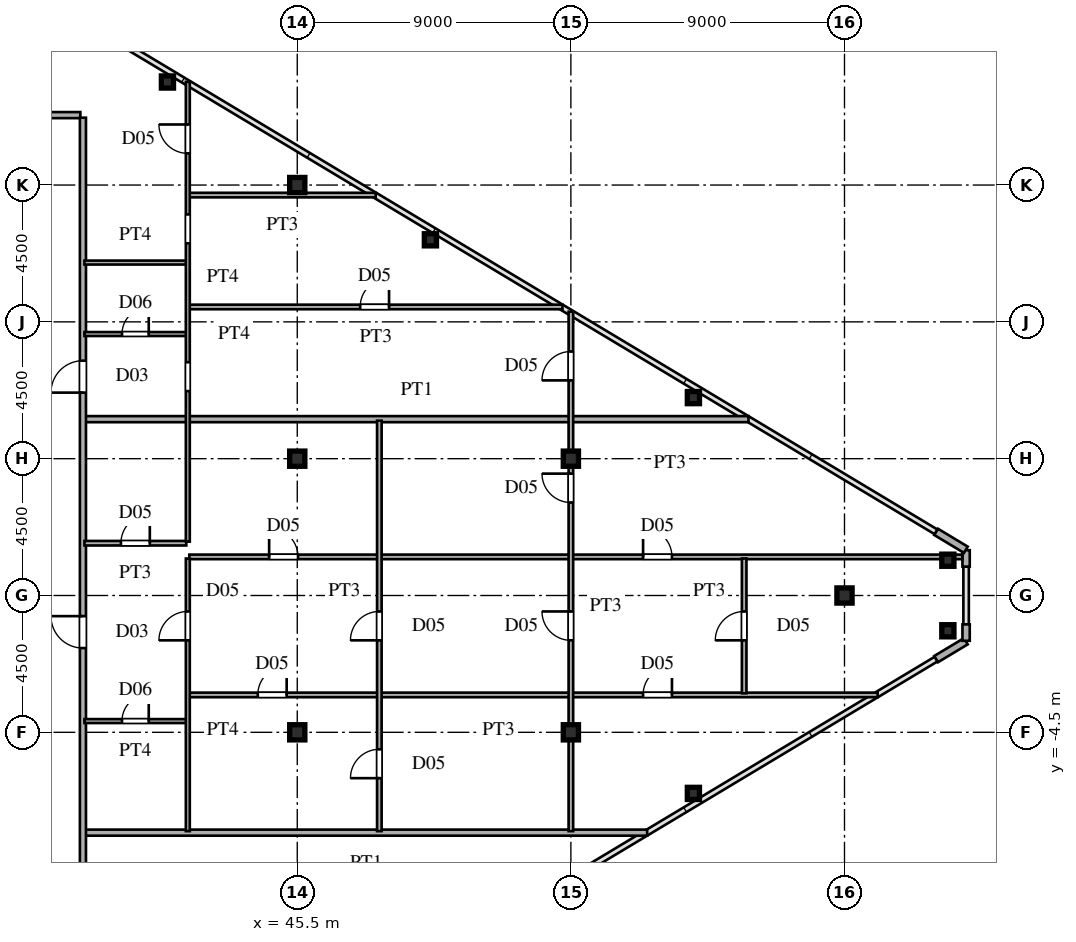
"""IFC4 building model, lengths in metres.
Left out: names, types, materials, properties, quantities, classifications, styles, units other than length and angle.
Written with IfcOpenShell. Run it as: python <this file> out.ifc"""

import sys

from ifc_helpers import new_model, si_unit, direction, frame, frame_2d, origin, origin_2d, place, context, subcontext, project, spatial, rectangle, hollow_rectangle, i_section, extrude, source, transform, mapped, element, fill, save


model = new_model("IFC4")
c1 = context("Model", 3, precision=1e-05, world=origin(), true_north=direction((0.0, 1.0)))
c2 = subcontext(c1, "Body", "Model", "MODEL_VIEW")
j1 = project(units=[si_unit("LENGTHUNIT", "METRE"), si_unit("PLANEANGLEUNIT", "RADIAN")], contexts=[c1])
p1 = place(None, origin())
s1 = spatial("IfcSite", under=j1, at=p1, CompositionType="ELEMENT")
p2 = place(p1, origin())
s2 = spatial("IfcBuilding", under=s1, at=p2, CompositionType="ELEMENT")
p3 = place(p2, frame((0.0, 0.0, 195.9)))
s3 = spatial("IfcBuildingStorey", under=s2, at=p3, CompositionType="ELEMENT", Elevation=195.9)
m1 = source(origin(), c2, "Body", "SweptSolid", [
    extrude(i_section(OverallWidth=0.5, OverallDepth=0.5, WebThickness=0.02, FlangeThickness=0.032, at=origin_2d()), origin(), (0.0, 0.0, 1.0), 3.6),
])
for number, where, z_axis, x_axis in (
    (1, (45.5, -4.5, 0.0), (0.0, 0.0, 1.0), (1.0, 0.0, 0.0)),
    (2, (45.5, 4.5, 0.0), (0.0, 0.0, 1.0), (1.0, 0.0, 0.0)),
    (3, (45.5, 13.5, 0.0), (0.0, 0.0, 1.0), (1.0, 0.0, 0.0)),
    (4, (54.5, -4.5, 0.0), (0.0, 0.0, 1.0), (1.0, 0.0, 0.0)),
    (5, (54.5, 4.5, 0.0), (0.0, 0.0, 1.0), (1.0, 0.0, 0.0)),
    (6, (63.5, 0.0, 0.0), (0.0, 0.0, 1.0), (1.0, 0.0, 0.0)),
):
    element("IfcColumn", number, at=place(p3, frame(where, z_axis=z_axis, x_axis=x_axis)), inside=s3, PredefinedType="COLUMN", context=c2, shape_type="MappedRepresentation", body=[
        mapped(m1, transform((0.0, 0.0, 0.0), scale=1.0)),
    ])
m2 = source(origin(), c2, "Body", "SweptSolid", [
    extrude(hollow_rectangle(XDim=0.4, YDim=0.4, WallThickness=0.016, at=origin_2d()), origin(), (0.0, 0.0, 1.0), 3.6),
])
for number, where, z_axis, x_axis in (
    (7, (66.9, -1.16, 0.0), (0.0, 0.0, 1.0), (1.0, 0.0, 0.0)),
    (8, (66.9, 1.16, 0.0), (0.0, 0.0, 1.0), (1.0, 0.0, 0.0)),
    (9, (58.53, -6.509, 0.0), (0.0, 0.0, 1.0), (1.0, 0.0, 0.0)),
    (10, (41.23, 16.889, 0.0), (0.0, 0.0, 1.0), (1.0, 0.0, 0.0)),
    (11, (49.88, 11.699, 0.0), (0.0, 0.0, 1.0), (1.0, 0.0, 0.0)),
    (12, (58.53, 6.509, 0.0), (0.0, 0.0, 1.0), (1.0, 0.0, 0.0)),
):
    element("IfcColumn", number, at=place(p3, frame(where, z_axis=z_axis, x_axis=x_axis)), inside=s3, PredefinedType="COLUMN", context=c2, shape_type="MappedRepresentation", body=[
        mapped(m2, transform((0.0, 0.0, 0.0), scale=1.0)),
    ])
p4 = place(p3, frame((66.514, -2.092, 0.0), z_axis=(0.0, 0.0, 1.0), x_axis=(0.85743623509, 0.514590228002, 0.0)))
e13 = element("IfcWall", 13, at=p4, inside=s3, PredefinedType="SOLIDWALL", context=c2, shape_type="SweptSolid", body=[
    extrude(rectangle(XDim=1.14, YDim=0.24, at=frame_2d((0.57, 0.0))), origin(), (0.0, 0.0, 1.0), 3.38),
])
for number, where, z_axis, x_axis in (
    (14, (67.5, -1.49, 0.0), (0.0, 0.0, 1.0), (0.0, 1.0, 0.0)),
    (15, (67.5, 0.95, 0.0), (0.0, 0.0, 1.0), (0.0, 1.0, 0.0)),
):
    element("IfcWall", number, at=place(p3, frame(where, z_axis=z_axis, x_axis=x_axis)), inside=s3, PredefinedType="SOLIDWALL", context=c2, shape_type="SweptSolid", body=[
        extrude(rectangle(XDim=0.54, YDim=0.24, at=frame_2d((0.27, 0.0))), origin(), (0.0, 0.0, 1.0), 3.38),
    ])
p5 = place(p3, frame((67.491, 1.505, 0.0), z_axis=(0.0, 0.0, 1.0), x_axis=(-0.85743623509, 0.514590228002, 0.0)))
e16 = element("IfcWall", 16, at=p5, inside=s3, PredefinedType="SOLIDWALL", context=c2, shape_type="SweptSolid", body=[
    extrude(rectangle(XDim=1.14, YDim=0.24, at=frame_2d((0.57, 0.0))), origin(), (0.0, 0.0, 1.0), 3.38),
])
p6 = place(p3, frame((38.53, -7.8, 0.0), z_axis=(0.0, 0.0, 1.0), x_axis=(1.0, 0.0, 0.0)))
e17 = element("IfcWall", 17, at=p6, inside=s3, PredefinedType="PARTITIONING", context=c2, shape_type="SweptSolid", body=[
    extrude(rectangle(XDim=18.48, YDim=0.2, at=frame_2d((9.24, 0.0))), origin(), (0.0, 0.0, 1.0), 3.38),
])
p7 = place(p3, frame((38.5, -4.13, 0.0), z_axis=(0.0, 0.0, 1.0), x_axis=(1.0, 0.0, 0.0)))
e18 = element("IfcWall", 18, at=p7, inside=s3, PredefinedType="PARTITIONING", context=c2, shape_type="SweptSolid", body=[
    extrude(rectangle(XDim=3.35, YDim=0.13, at=frame_2d((1.675, 0.0))), origin(), (0.0, 0.0, 1.0), 3.38),
])
p8 = place(p7, frame((1.235, 0.0, 0.0)))
e19 = element("IfcOpeningElement", 19, at=p8, cuts=e18, PredefinedType="OPENING", context=c2, shape_type="SweptSolid", body=[
    extrude(rectangle(XDim=0.88, YDim=2.1, at=frame_2d((0.44, 1.05))), frame((0.0, 0.075, 0.0), z_axis=(0.0, -1.0, 0.0), x_axis=(1.0, 0.0, 0.0)), (0.0, 0.0, 1.0), 0.15),
])
p9 = place(p3, frame((41.95, -3.27, 0.0), z_axis=(0.0, 0.0, 1.0), x_axis=(1.0, 0.0, 0.0)))
e20 = element("IfcWall", 20, at=p9, inside=s3, PredefinedType="PARTITIONING", context=c2, shape_type="SweptSolid", body=[
    extrude(rectangle(XDim=22.641, YDim=0.15, at=frame_2d((11.321, 0.0))), origin(), (0.0, 0.0, 1.0), 3.38),
])
p10 = place(p9, frame((2.252, 0.0, 0.0)))
e21 = element("IfcOpeningElement", 21, at=p10, cuts=e20, PredefinedType="OPENING", context=c2, shape_type="SweptSolid", body=[
    extrude(rectangle(XDim=0.95, YDim=2.15, at=frame_2d((0.475, 1.075))), frame((0.0, 0.085, 0.0), z_axis=(0.0, -1.0, 0.0), x_axis=(1.0, 0.0, 0.0)), (0.0, 0.0, 1.0), 0.17),
])
p11 = place(p9, frame((14.925, 0.0, 0.0)))
e22 = element("IfcOpeningElement", 22, at=p11, cuts=e20, PredefinedType="OPENING", context=c2, shape_type="SweptSolid", body=[
    extrude(rectangle(XDim=0.95, YDim=2.15, at=frame_2d((0.475, 1.075))), frame((0.0, 0.085, 0.0), z_axis=(0.0, -1.0, 0.0), x_axis=(1.0, 0.0, 0.0)), (0.0, 0.0, 1.0), 0.17),
])
p12 = place(p3, frame((41.95, 1.27, 0.0), z_axis=(0.0, 0.0, 1.0), x_axis=(1.0, 0.0, 0.0)))
e23 = element("IfcWall", 23, at=p12, inside=s3, PredefinedType="PARTITIONING", context=c2, shape_type="SweptSolid", body=[
    extrude(rectangle(XDim=25.425, YDim=0.15, at=frame_2d((12.712, 0.0))), origin(), (0.0, 0.0, 1.0), 3.38),
])
p13 = place(p12, frame((2.625, 0.0, 0.0)))
e24 = element("IfcOpeningElement", 24, at=p13, cuts=e23, PredefinedType="OPENING", context=c2, shape_type="SweptSolid", body=[
    extrude(rectangle(XDim=0.95, YDim=2.15, at=frame_2d((0.475, 1.075))), frame((0.0, 0.085, 0.0), z_axis=(0.0, -1.0, 0.0), x_axis=(1.0, 0.0, 0.0)), (0.0, 0.0, 1.0), 0.17),
])
p14 = place(p12, frame((14.925, 0.0, 0.0)))
e25 = element("IfcOpeningElement", 25, at=p14, cuts=e23, PredefinedType="OPENING", context=c2, shape_type="SweptSolid", body=[
    extrude(rectangle(XDim=0.95, YDim=2.15, at=frame_2d((0.475, 1.075))), frame((0.0, 0.085, 0.0), z_axis=(0.0, -1.0, 0.0), x_axis=(1.0, 0.0, 0.0)), (0.0, 0.0, 1.0), 0.17),
])
p15 = place(p3, frame((38.5, 1.72, 0.0), z_axis=(0.0, 0.0, 1.0), x_axis=(1.0, 0.0, 0.0)))
e26 = element("IfcWall", 26, at=p15, inside=s3, PredefinedType="PARTITIONING", context=c2, shape_type="SweptSolid", body=[
    extrude(rectangle(XDim=3.35, YDim=0.15, at=frame_2d((1.675, 0.0))), origin(), (0.0, 0.0, 1.0), 3.38),
])
p16 = place(p15, frame((1.2, 0.0, 0.0)))
e27 = element("IfcOpeningElement", 27, at=p16, cuts=e26, PredefinedType="OPENING", context=c2, shape_type="SweptSolid", body=[
    extrude(rectangle(XDim=0.95, YDim=2.15, at=frame_2d((0.475, 1.075))), frame((0.0, 0.085, 0.0), z_axis=(0.0, -1.0, 0.0), x_axis=(1.0, 0.0, 0.0)), (0.0, 0.0, 1.0), 0.17),
])
p17 = place(p3, frame((38.53, 5.8, 0.0), z_axis=(0.0, 0.0, 1.0), x_axis=(1.0, 0.0, 0.0)))
e28 = element("IfcWall", 28, at=p17, inside=s3, PredefinedType="PARTITIONING", context=c2, shape_type="SweptSolid", body=[
    extrude(rectangle(XDim=21.813, YDim=0.2, at=frame_2d((10.906, 0.0))), origin(), (0.0, 0.0, 1.0), 3.38),
])
p18 = place(p3, frame((38.5, 8.6, 0.0), z_axis=(0.0, 0.0, 1.0), x_axis=(1.0, 0.0, 0.0)))
e29 = element("IfcWall", 29, at=p18, inside=s3, PredefinedType="PARTITIONING", context=c2, shape_type="SweptSolid", body=[
    extrude(rectangle(XDim=3.35, YDim=0.13, at=frame_2d((1.675, 0.0))), origin(), (0.0, 0.0, 1.0), 3.38),
])
p19 = place(p18, frame((1.235, 0.0, 0.0)))
e30 = element("IfcOpeningElement", 30, at=p19, cuts=e29, PredefinedType="OPENING", context=c2, shape_type="SweptSolid", body=[
    extrude(rectangle(XDim=0.88, YDim=2.1, at=frame_2d((0.44, 1.05))), frame((0.0, 0.075, 0.0), z_axis=(0.0, -1.0, 0.0), x_axis=(1.0, 0.0, 0.0)), (0.0, 0.0, 1.0), 0.15),
])
p20 = place(p3, frame((41.95, 9.49, 0.0), z_axis=(0.0, 0.0, 1.0), x_axis=(1.0, 0.0, 0.0)))
e31 = element("IfcWall", 31, at=p20, inside=s3, PredefinedType="PARTITIONING", context=c2, shape_type="SweptSolid", body=[
    extrude(rectangle(XDim=12.274, YDim=0.15, at=frame_2d((6.137, 0.0))), origin(), (0.0, 0.0, 1.0), 3.38),
])
p21 = place(p20, frame((5.619, 0.0, 0.0)))
e32 = element("IfcOpeningElement", 32, at=p21, cuts=e31, PredefinedType="OPENING", context=c2, shape_type="SweptSolid", body=[
    extrude(rectangle(XDim=0.95, YDim=2.15, at=frame_2d((0.475, 1.075))), frame((0.0, 0.085, 0.0), z_axis=(0.0, -1.0, 0.0), x_axis=(1.0, 0.0, 0.0)), (0.0, 0.0, 1.0), 0.17),
])
p22 = place(p3, frame((38.5, 10.95, 0.0), z_axis=(0.0, 0.0, 1.0), x_axis=(1.0, 0.0, 0.0)))
e33 = element("IfcWall", 33, at=p22, inside=s3, PredefinedType="PARTITIONING", context=c2, shape_type="SweptSolid", body=[
    extrude(rectangle(XDim=3.35, YDim=0.13, at=frame_2d((1.675, 0.0))), origin(), (0.0, 0.0, 1.0), 3.38),
])
p23 = place(p3, frame((41.95, 13.17, 0.0), z_axis=(0.0, 0.0, 1.0), x_axis=(1.0, 0.0, 0.0)))
e34 = element("IfcWall", 34, at=p23, inside=s3, PredefinedType="PARTITIONING", context=c2, shape_type="SweptSolid", body=[
    extrude(rectangle(XDim=6.13, YDim=0.15, at=frame_2d((3.065, 0.0))), origin(), (0.0, 0.0, 1.0), 3.38),
])
p24 = place(p3, frame((27.625, 15.8, 0.0), z_axis=(0.0, 0.0, 1.0), x_axis=(1.0, 0.0, 0.0)))
e35 = element("IfcWall", 35, at=p24, inside=s3, PredefinedType="PARTITIONING", context=c2, shape_type="SweptSolid", body=[
    extrude(rectangle(XDim=10.74, YDim=0.2, at=frame_2d((5.37, 0.0))), origin(), (0.0, 0.0, 1.0), 3.38),
])
p25 = place(p3, frame((38.45, -15.715, 0.0), z_axis=(0.0, 0.0, 1.0), x_axis=(0.0, 1.0, 0.0)))
e36 = element("IfcWall", 36, at=p25, inside=s3, PredefinedType="PARTITIONING", context=c2, shape_type="SweptSolid", body=[
    extrude(rectangle(XDim=31.43, YDim=0.2, at=frame_2d((15.715, 0.0))), origin(), (0.0, 0.0, 1.0), 3.38),
])
p26 = place(p25, frame((3.39, 0.0, 0.0)))
e37 = element("IfcOpeningElement", 37, at=p26, cuts=e36, PredefinedType="OPENING", context=c2, shape_type="SweptSolid", body=[
    extrude(rectangle(XDim=1.05, YDim=2.25, at=frame_2d((0.525, 1.125))), frame((0.0, 0.11, 0.0), z_axis=(0.0, -1.0, 0.0), x_axis=(1.0, 0.0, 0.0)), (0.0, 0.0, 1.0), 0.22),
])
p27 = place(p25, frame((13.986, 0.0, 0.0)))
e38 = element("IfcOpeningElement", 38, at=p27, cuts=e36, PredefinedType="OPENING", context=c2, shape_type="SweptSolid", body=[
    extrude(rectangle(XDim=1.05, YDim=2.25, at=frame_2d((0.525, 1.125))), frame((0.0, 0.11, 0.0), z_axis=(0.0, -1.0, 0.0), x_axis=(1.0, 0.0, 0.0)), (0.0, 0.0, 1.0), 0.22),
])
p28 = place(p25, frame((22.387, 0.0, 0.0)))
e39 = element("IfcOpeningElement", 39, at=p28, cuts=e36, PredefinedType="OPENING", context=c2, shape_type="SweptSolid", body=[
    extrude(rectangle(XDim=1.05, YDim=2.25, at=frame_2d((0.525, 1.125))), frame((0.0, 0.11, 0.0), z_axis=(0.0, -1.0, 0.0), x_axis=(1.0, 0.0, 0.0)), (0.0, 0.0, 1.0), 0.22),
])
p29 = place(p3, frame((41.9, -7.75, 0.0), z_axis=(0.0, 0.0, 1.0), x_axis=(0.0, 1.0, 0.0)))
e40 = element("IfcWall", 40, at=p29, inside=s3, PredefinedType="PARTITIONING", context=c2, shape_type="SweptSolid", body=[
    extrude(rectangle(XDim=8.967, YDim=0.13, at=frame_2d((4.483, 0.0))), origin(), (0.0, 0.0, 1.0), 3.38),
])
p30 = place(p29, frame((6.275, 0.0, 0.0)))
e41 = element("IfcOpeningElement", 41, at=p30, cuts=e40, PredefinedType="OPENING", context=c2, shape_type="SweptSolid", body=[
    extrude(rectangle(XDim=0.95, YDim=2.15, at=frame_2d((0.475, 1.075))), frame((0.0, 0.075, 0.0), z_axis=(0.0, -1.0, 0.0), x_axis=(1.0, 0.0, 0.0)), (0.0, 0.0, 1.0), 0.15),
])
p31 = place(p3, frame((41.9, 1.772, 0.0), z_axis=(0.0, 0.0, 1.0), x_axis=(0.0, 1.0, 0.0)))
e42 = element("IfcWall", 42, at=p31, inside=s3, PredefinedType="PARTITIONING", context=c2, shape_type="SweptSolid", body=[
    extrude(rectangle(XDim=15.123, YDim=0.13, at=frame_2d((7.562, 0.0))), origin(), (0.0, 0.0, 1.0), 3.38),
])
p32 = place(p31, frame((4.95, 0.0, 0.0)))
e43 = element("IfcOpeningElement", 43, at=p32, cuts=e42, PredefinedType="OPENING", context=c2, shape_type="SweptSolid", body=[
    extrude(rectangle(XDim=0.95, YDim=2.15, at=frame_2d((0.475, 1.075))), frame((0.0, 0.075, 0.0), z_axis=(0.0, -1.0, 0.0), x_axis=(1.0, 0.0, 0.0)), (0.0, 0.0, 1.0), 0.15),
])
p33 = place(p31, frame((9.812, 0.0, 0.0)))
e44 = element("IfcOpeningElement", 44, at=p33, cuts=e42, PredefinedType="OPENING", context=c2, shape_type="SweptSolid", body=[
    extrude(rectangle(XDim=0.95, YDim=2.15, at=frame_2d((0.475, 1.075))), frame((0.0, 0.075, 0.0), z_axis=(0.0, -1.0, 0.0), x_axis=(1.0, 0.0, 0.0)), (0.0, 0.0, 1.0), 0.15),
])
p34 = place(p31, frame((12.77, 0.0, 0.0)))
e45 = element("IfcOpeningElement", 45, at=p34, cuts=e42, PredefinedType="OPENING", context=c2, shape_type="SweptSolid", body=[
    extrude(rectangle(XDim=0.95, YDim=2.15, at=frame_2d((0.475, 1.075))), frame((0.0, 0.075, 0.0), z_axis=(0.0, -1.0, 0.0), x_axis=(1.0, 0.0, 0.0)), (0.0, 0.0, 1.0), 0.15),
])
p35 = place(p3, frame((48.2, -7.75, 0.0), z_axis=(0.0, 0.0, 1.0), x_axis=(0.0, 1.0, 0.0)))
e46 = element("IfcWall", 46, at=p35, inside=s3, PredefinedType="PARTITIONING", context=c2, shape_type="SweptSolid", body=[
    extrude(rectangle(XDim=13.5, YDim=0.15, at=frame_2d((6.75, 0.0))), origin(), (0.0, 0.0, 1.0), 3.38),
])
p36 = place(p35, frame((6.275, 0.0, 0.0)))
e47 = element("IfcOpeningElement", 47, at=p36, cuts=e46, PredefinedType="OPENING", context=c2, shape_type="SweptSolid", body=[
    extrude(rectangle(XDim=0.95, YDim=2.15, at=frame_2d((0.475, 1.075))), frame((0.0, 0.085, 0.0), z_axis=(0.0, -1.0, 0.0), x_axis=(1.0, 0.0, 0.0)), (0.0, 0.0, 1.0), 0.17),
])
p37 = place(p35, frame((1.742, 0.0, 0.0)))
e48 = element("IfcOpeningElement", 48, at=p37, cuts=e46, PredefinedType="OPENING", context=c2, shape_type="SweptSolid", body=[
    extrude(rectangle(XDim=0.95, YDim=2.15, at=frame_2d((0.475, 1.075))), frame((0.0, 0.085, 0.0), z_axis=(0.0, -1.0, 0.0), x_axis=(1.0, 0.0, 0.0)), (0.0, 0.0, 1.0), 0.17),
])
p38 = place(p3, frame((54.5, -7.75, 0.0), z_axis=(0.0, 0.0, 1.0), x_axis=(0.0, 1.0, 0.0)))
e49 = element("IfcWall", 49, at=p38, inside=s3, PredefinedType="PARTITIONING", context=c2, shape_type="SweptSolid", body=[
    extrude(rectangle(XDim=17.085, YDim=0.15, at=frame_2d((8.542, 0.0))), origin(), (0.0, 0.0, 1.0), 2.78),
])
p39 = place(p38, frame((6.275, 0.0, 0.0)))
e50 = element("IfcOpeningElement", 50, at=p39, cuts=e49, PredefinedType="OPENING", context=c2, shape_type="SweptSolid", body=[
    extrude(rectangle(XDim=0.95, YDim=2.15, at=frame_2d((0.475, 1.075))), frame((0.0, 0.085, 0.0), z_axis=(0.0, -1.0, 0.0), x_axis=(1.0, 0.0, 0.0)), (0.0, 0.0, 1.0), 0.17),
])
p40 = place(p38, frame((10.808, 0.0, 0.0)))
e51 = element("IfcOpeningElement", 51, at=p40, cuts=e49, PredefinedType="OPENING", context=c2, shape_type="SweptSolid", body=[
    extrude(rectangle(XDim=0.95, YDim=2.15, at=frame_2d((0.475, 1.075))), frame((0.0, 0.085, 0.0), z_axis=(0.0, -1.0, 0.0), x_axis=(1.0, 0.0, 0.0)), (0.0, 0.0, 1.0), 0.17),
])
p41 = place(p38, frame((14.825, 0.0, 0.0)))
e52 = element("IfcOpeningElement", 52, at=p41, cuts=e49, PredefinedType="OPENING", context=c2, shape_type="SweptSolid", body=[
    extrude(rectangle(XDim=0.95, YDim=2.15, at=frame_2d((0.475, 1.075))), frame((0.0, 0.085, 0.0), z_axis=(0.0, -1.0, 0.0), x_axis=(1.0, 0.0, 0.0)), (0.0, 0.0, 1.0), 0.17),
])
p42 = place(p3, frame((60.2, -3.217, 0.0), z_axis=(0.0, 0.0, 1.0), x_axis=(0.0, 1.0, 0.0)))
e53 = element("IfcWall", 53, at=p42, inside=s3, PredefinedType="PARTITIONING", context=c2, shape_type="SweptSolid", body=[
    extrude(rectangle(XDim=4.434, YDim=0.15, at=frame_2d((2.217, 0.0))), origin(), (0.0, 0.0, 1.0), 3.38),
])
p43 = place(p42, frame((1.742, 0.0, 0.0)))
e54 = element("IfcOpeningElement", 54, at=p43, cuts=e53, PredefinedType="OPENING", context=c2, shape_type="SweptSolid", body=[
    extrude(rectangle(XDim=0.95, YDim=2.15, at=frame_2d((0.475, 1.075))), frame((0.0, 0.085, 0.0), z_axis=(0.0, -1.0, 0.0), x_axis=(1.0, 0.0, 0.0)), (0.0, 0.0, 1.0), 0.17),
])
m3 = source(origin(), c2, "Body", "SweptSolid", [
    extrude(rectangle(XDim=0.88, YDim=2.1, at=frame_2d((0.44, 1.05))), frame((0.0, 0.025, 0.0), z_axis=(0.0, -1.0, 0.0), x_axis=(1.0, 0.0, 0.0)), (0.0, 0.0, 1.0), 0.05),
])
p44 = place(p8, origin())
e55 = element("IfcDoor", 55, at=p44, inside=s3, OperationType="SINGLE_SWING_RIGHT", PredefinedType="DOOR", context=c2, shape_type="MappedRepresentation", body=[
    mapped(m3, transform((0.0, 0.0, 0.0), scale=1.0)),
])
fill(e19, e55)
m4 = source(origin(), c2, "Body", "SweptSolid", [
    extrude(rectangle(XDim=0.95, YDim=2.15, at=frame_2d((0.475, 1.075))), frame((0.0, 0.025, 0.0), z_axis=(0.0, -1.0, 0.0), x_axis=(1.0, 0.0, 0.0)), (0.0, 0.0, 1.0), 0.05),
])
p45 = place(p10, origin())
e56 = element("IfcDoor", 56, at=p45, inside=s3, OperationType="SINGLE_SWING_RIGHT", PredefinedType="DOOR", context=c2, shape_type="MappedRepresentation", body=[
    mapped(m4, transform((0.0, 0.0, 0.0), scale=1.0)),
])
fill(e21, e56)
p46 = place(p11, origin())
e57 = element("IfcDoor", 57, at=p46, inside=s3, OperationType="SINGLE_SWING_RIGHT", PredefinedType="DOOR", context=c2, shape_type="MappedRepresentation", body=[
    mapped(m4, transform((0.0, 0.0, 0.0), scale=1.0)),
])
fill(e22, e57)
p47 = place(p13, origin())
e58 = element("IfcDoor", 58, at=p47, inside=s3, OperationType="SINGLE_SWING_LEFT", PredefinedType="DOOR", context=c2, shape_type="MappedRepresentation", body=[
    mapped(m4, transform((0.0, 0.0, 0.0), scale=1.0)),
])
fill(e24, e58)
p48 = place(p14, origin())
e59 = element("IfcDoor", 59, at=p48, inside=s3, OperationType="SINGLE_SWING_LEFT", PredefinedType="DOOR", context=c2, shape_type="MappedRepresentation", body=[
    mapped(m4, transform((0.0, 0.0, 0.0), scale=1.0)),
])
fill(e25, e59)
p49 = place(p16, origin())
e60 = element("IfcDoor", 60, at=p49, inside=s3, OperationType="SINGLE_SWING_RIGHT", PredefinedType="DOOR", context=c2, shape_type="MappedRepresentation", body=[
    mapped(m4, transform((0.0, 0.0, 0.0), scale=1.0)),
])
fill(e27, e60)
p50 = place(p19, origin())
e61 = element("IfcDoor", 61, at=p50, inside=s3, OperationType="SINGLE_SWING_RIGHT", PredefinedType="DOOR", context=c2, shape_type="MappedRepresentation", body=[
    mapped(m3, transform((0.0, 0.0, 0.0), scale=1.0)),
])
fill(e30, e61)
p51 = place(p21, origin())
e62 = element("IfcDoor", 62, at=p51, inside=s3, OperationType="SINGLE_SWING_RIGHT", PredefinedType="DOOR", context=c2, shape_type="MappedRepresentation", body=[
    mapped(m4, transform((0.0, 0.0, 0.0), scale=1.0)),
])
fill(e32, e62)
m5 = source(origin(), c2, "Body", "SweptSolid", [
    extrude(rectangle(XDim=1.05, YDim=2.25, at=frame_2d((0.525, 1.125))), frame((0.0, 0.025, 0.0), z_axis=(0.0, -1.0, 0.0), x_axis=(1.0, 0.0, 0.0)), (0.0, 0.0, 1.0), 0.05),
])
p52 = place(p27, origin())
e63 = element("IfcDoor", 63, at=p52, inside=s3, OperationType="SINGLE_SWING_RIGHT", PredefinedType="DOOR", context=c2, shape_type="MappedRepresentation", body=[
    mapped(m5, transform((0.0, 0.0, 0.0), scale=1.0)),
])
fill(e38, e63)
p53 = place(p28, origin())
e64 = element("IfcDoor", 64, at=p53, inside=s3, OperationType="SINGLE_SWING_LEFT", PredefinedType="DOOR", context=c2, shape_type="MappedRepresentation", body=[
    mapped(m5, transform((0.0, 0.0, 0.0), scale=1.0)),
])
fill(e39, e64)
p54 = place(p30, origin())
e65 = element("IfcDoor", 65, at=p54, inside=s3, OperationType="SINGLE_SWING_LEFT", PredefinedType="DOOR", context=c2, shape_type="MappedRepresentation", body=[
    mapped(m4, transform((0.0, 0.0, 0.0), scale=1.0)),
])
fill(e41, e65)
p55 = place(p34, origin())
e66 = element("IfcDoor", 66, at=p55, inside=s3, OperationType="SINGLE_SWING_RIGHT", PredefinedType="DOOR", context=c2, shape_type="MappedRepresentation", body=[
    mapped(m4, transform((0.0, 0.0, 0.0), scale=1.0)),
])
fill(e45, e66)
p56 = place(p36, origin())
e67 = element("IfcDoor", 67, at=p56, inside=s3, OperationType="SINGLE_SWING_LEFT", PredefinedType="DOOR", context=c2, shape_type="MappedRepresentation", body=[
    mapped(m4, transform((0.0, 0.0, 0.0), scale=1.0)),
])
fill(e47, e67)
p57 = place(p37, origin())
e68 = element("IfcDoor", 68, at=p57, inside=s3, OperationType="SINGLE_SWING_LEFT", PredefinedType="DOOR", context=c2, shape_type="MappedRepresentation", body=[
    mapped(m4, transform((0.0, 0.0, 0.0), scale=1.0)),
])
fill(e48, e68)
p58 = place(p39, origin())
e69 = element("IfcDoor", 69, at=p58, inside=s3, OperationType="SINGLE_SWING_RIGHT", PredefinedType="DOOR", context=c2, shape_type="MappedRepresentation", body=[
    mapped(m4, transform((0.0, 0.0, 0.0), scale=1.0)),
])
fill(e50, e69)
p59 = place(p40, origin())
e70 = element("IfcDoor", 70, at=p59, inside=s3, OperationType="SINGLE_SWING_RIGHT", PredefinedType="DOOR", context=c2, shape_type="MappedRepresentation", body=[
    mapped(m4, transform((0.0, 0.0, 0.0), scale=1.0)),
])
fill(e51, e70)
p60 = place(p41, origin())
e71 = element("IfcDoor", 71, at=p60, inside=s3, OperationType="SINGLE_SWING_LEFT", PredefinedType="DOOR", context=c2, shape_type="MappedRepresentation", body=[
    mapped(m4, transform((0.0, 0.0, 0.0), scale=1.0)),
])
fill(e52, e71)
p61 = place(p43, origin())
e72 = element("IfcDoor", 72, at=p61, inside=s3, OperationType="SINGLE_SWING_LEFT", PredefinedType="DOOR", context=c2, shape_type="MappedRepresentation", body=[
    mapped(m4, transform((0.0, 0.0, 0.0), scale=1.0)),
])
fill(e54, e72)
save(model, sys.argv[1])
